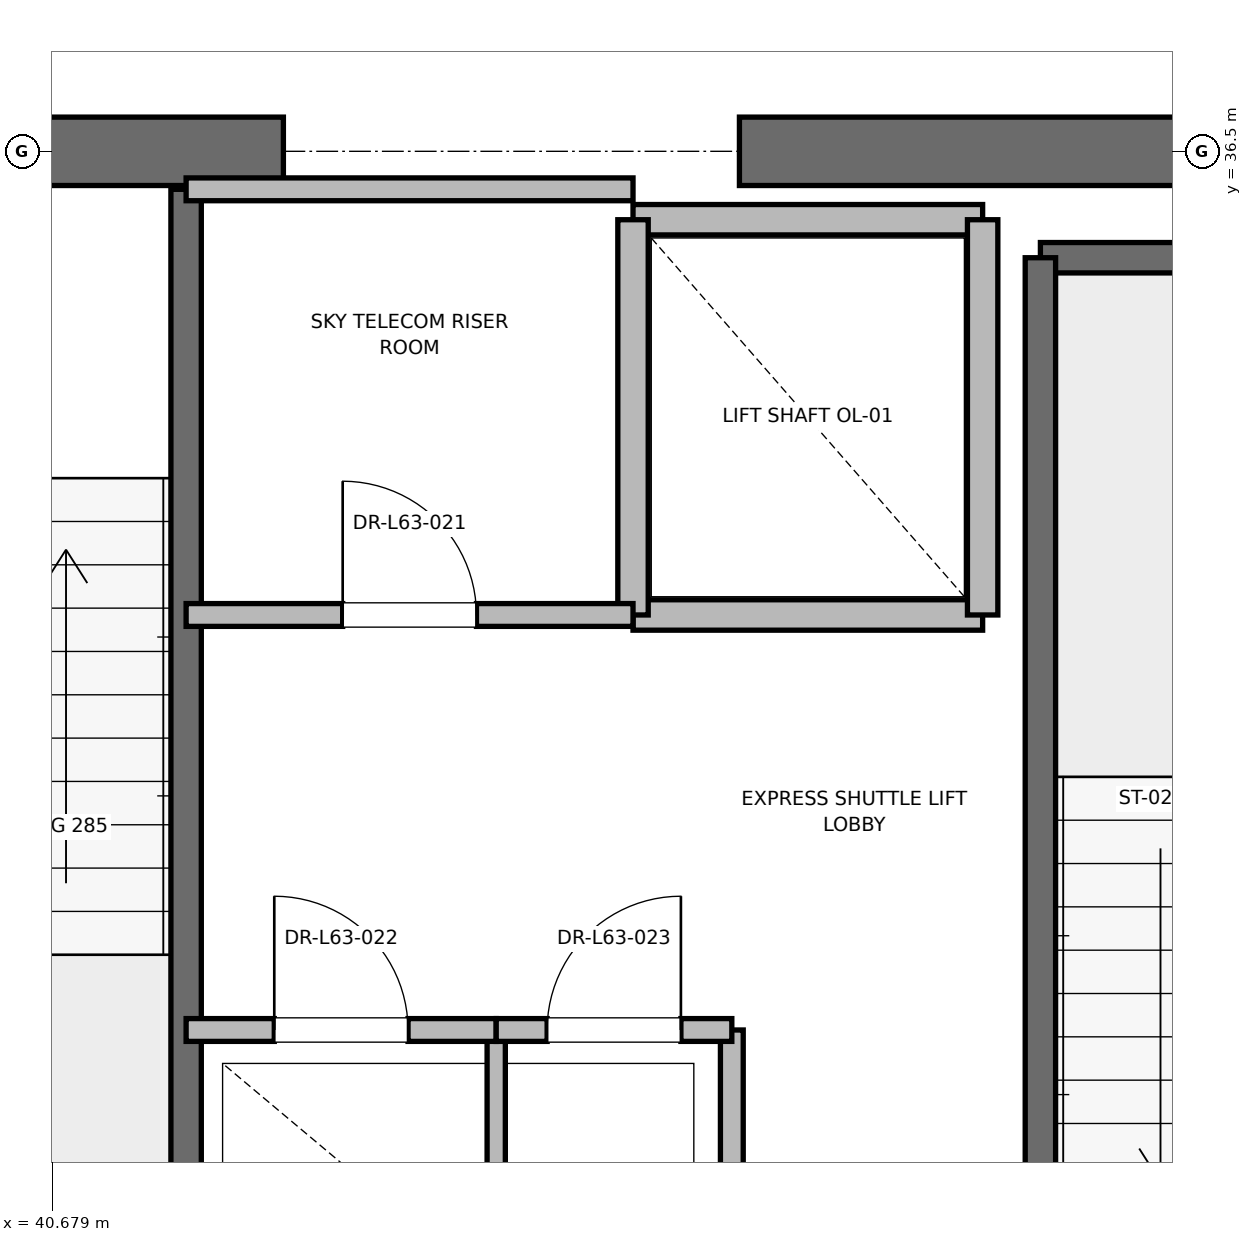
"""IFC4 building model, lengths in metres.
Left out: names, types, materials, properties, quantities, classifications, styles, units other than length and angle.
Written with IfcOpenShell. Run it as: python <this file> out.ifc"""

import sys

from ifc_helpers import new_model, si_unit, direction, frame, frame_2d, origin, place, context, subcontext, project, spatial, rectangle, extrude, element, fill, save


model = new_model("IFC4")
c1 = context("Model", 3, precision=1e-05, world=origin(), true_north=direction((0.0, 1.0)))
c2 = subcontext(c1, "Body", "Model", "MODEL_VIEW")
j1 = project(units=[si_unit("LENGTHUNIT", "METRE"), si_unit("PLANEANGLEUNIT", "RADIAN")], contexts=[c1])
p1 = place(None, origin())
s1 = spatial("IfcSite", under=j1, at=p1, CompositionType="ELEMENT")
p2 = place(p1, origin())
s2 = spatial("IfcBuilding", under=s1, at=p2, CompositionType="ELEMENT")
p3 = place(p2, frame((0.0, 0.0, 271.2)))
s3 = spatial("IfcBuildingStorey", under=s2, at=p3, CompositionType="ELEMENT", Elevation=271.2)
p4 = place(p3, frame((37.8, 36.5, 0.0), z_axis=(0.0, 0.0, 1.0), x_axis=(1.0, 0.0, 0.0)))
e1 = element("IfcWall", 1, at=p4, inside=s3, PredefinedType="SHEAR", context=c2, shape_type="SweptSolid", body=[
    extrude(rectangle(XDim=4.4, YDim=0.45, at=frame_2d((2.2, 0.0))), origin(), (0.0, 0.0, 1.0), 3.785),
])
p5 = place(p4, frame((1.65, 0.0, 0.0)))
e2 = element("IfcOpeningElement", 2, at=p5, cuts=e1, PredefinedType="OPENING", context=c2, shape_type="SweptSolid", body=[
    extrude(rectangle(XDim=1.1, YDim=2.15, at=frame_2d((0.55, 1.075))), frame((0.0, 0.225, 0.0), z_axis=(0.0, -1.0, 0.0), x_axis=(1.0, 0.0, 0.0)), (0.0, 0.0, 1.0), 0.45),
])
p6 = place(p3, frame((45.2, 36.5, 0.0), z_axis=(0.0, 0.0, 1.0), x_axis=(1.0, 0.0, 0.0)))
e3 = element("IfcWall", 3, at=p6, inside=s3, PredefinedType="SHEAR", context=c2, shape_type="SweptSolid", body=[
    extrude(rectangle(XDim=5.8, YDim=0.45, at=frame_2d((2.9, 0.0))), origin(), (0.0, 0.0, 1.0), 3.785),
])
p7 = place(p3, frame((47.18, 35.8, 0.0), z_axis=(0.0, 0.0, 1.0), x_axis=(1.0, 0.0, 0.0)))
e4 = element("IfcWall", 4, at=p7, inside=s3, PredefinedType="SOLIDWALL", context=c2, shape_type="SweptSolid", body=[
    extrude(rectangle(XDim=3.12, YDim=0.2, at=frame_2d((1.56, 0.0))), origin(), (0.0, 0.0, 1.0), 3.785),
])
p8 = place(p3, frame((47.18, 27.62, 0.0), z_axis=(0.0, 0.0, 1.0), x_axis=(0.0, 1.0, 0.0)))
e5 = element("IfcWall", 5, at=p8, inside=s3, PredefinedType="SOLIDWALL", context=c2, shape_type="SweptSolid", body=[
    extrude(rectangle(XDim=8.18, YDim=0.2, at=frame_2d((4.09, 0.0))), origin(), (0.0, 0.0, 1.0), 3.785),
])
p9 = place(p3, frame((41.56, 27.68, 0.0), z_axis=(0.0, 0.0, 1.0), x_axis=(0.0, 1.0, 0.0)))
e6 = element("IfcWall", 6, at=p9, inside=s3, PredefinedType="SOLIDWALL", context=c2, shape_type="SweptSolid", body=[
    extrude(rectangle(XDim=8.57, YDim=0.2, at=frame_2d((4.285, 0.0))), origin(), (0.0, 0.0, 1.0), 3.785),
])
p10 = place(p3, frame((44.5, 33.45, 0.0), z_axis=(0.0, 0.0, 1.0), x_axis=(1.0, 0.0, 0.0)))
e7 = element("IfcWall", 7, at=p10, inside=s3, PredefinedType="SOLIDWALL", context=c2, shape_type="SweptSolid", body=[
    extrude(rectangle(XDim=2.3, YDim=0.2, at=frame_2d((1.15, 0.0))), origin(), (0.0, 0.0, 1.0), 3.785),
])
p11 = place(p3, frame((46.8, 36.05, 0.0), z_axis=(0.0, 0.0, 1.0), x_axis=(-1.0, 0.0, 0.0)))
e8 = element("IfcWall", 8, at=p11, inside=s3, PredefinedType="SOLIDWALL", context=c2, shape_type="SweptSolid", body=[
    extrude(rectangle(XDim=2.3, YDim=0.2, at=frame_2d((1.15, 0.0))), origin(), (0.0, 0.0, 1.0), 2.865),
])
p12 = place(p3, frame((44.5, 36.05, 0.0), z_axis=(0.0, 0.0, 1.0), x_axis=(0.0, -1.0, 0.0)))
e9 = element("IfcWall", 9, at=p12, inside=s3, PredefinedType="SOLIDWALL", context=c2, shape_type="SweptSolid", body=[
    extrude(rectangle(XDim=2.6, YDim=0.2, at=frame_2d((1.3, 0.0))), origin(), (0.0, 0.0, 1.0), 2.865),
])
p13 = place(p3, frame((46.8, 33.45, 0.0), z_axis=(0.0, 0.0, 1.0), x_axis=(0.0, 1.0, 0.0)))
e10 = element("IfcWall", 10, at=p13, inside=s3, PredefinedType="SOLIDWALL", context=c2, shape_type="SweptSolid", body=[
    extrude(rectangle(XDim=2.6, YDim=0.2, at=frame_2d((1.3, 0.0))), origin(), (0.0, 0.0, 1.0), 3.785),
])
p14 = place(p3, frame((45.15, 27.62, 0.0), z_axis=(0.0, 0.0, 1.0), x_axis=(0.0, 1.0, 0.0)))
e11 = element("IfcWall", 11, at=p14, inside=s3, PredefinedType="PARTITIONING", context=c2, shape_type="SweptSolid", body=[
    extrude(rectangle(XDim=3.1, YDim=0.15, at=frame_2d((1.55, 0.0))), origin(), (0.0, 0.0, 1.0), 2.85),
])
p15 = place(p3, frame((43.6, 27.68, 0.0), z_axis=(0.0, 0.0, 1.0), x_axis=(0.0, 1.0, 0.0)))
e12 = element("IfcWall", 12, at=p15, inside=s3, PredefinedType="PARTITIONING", context=c2, shape_type="SweptSolid", body=[
    extrude(rectangle(XDim=3.04, YDim=0.12, at=frame_2d((1.52, 0.0))), origin(), (0.0, 0.0, 1.0), 2.85),
])
p16 = place(p3, frame((41.56, 30.72, 0.0), z_axis=(0.0, 0.0, 1.0), x_axis=(1.0, 0.0, 0.0)))
e13 = element("IfcWall", 13, at=p16, inside=s3, PredefinedType="PARTITIONING", context=c2, shape_type="SweptSolid", body=[
    extrude(rectangle(XDim=2.04, YDim=0.15, at=frame_2d((1.02, 0.0))), origin(), (0.0, 0.0, 1.0), 2.85),
])
p17 = place(p16, frame((0.58, 0.0, 0.0)))
e14 = element("IfcOpeningElement", 14, at=p17, cuts=e13, PredefinedType="OPENING", context=c2, shape_type="SweptSolid", body=[
    extrude(rectangle(XDim=0.88, YDim=2.1, at=frame_2d((0.44, 1.05))), frame((0.0, 0.075, 0.0), z_axis=(0.0, -1.0, 0.0), x_axis=(1.0, 0.0, 0.0)), (0.0, 0.0, 1.0), 0.15),
])
p18 = place(p3, frame((43.6, 30.72, 0.0), z_axis=(0.0, 0.0, 1.0), x_axis=(1.0, 0.0, 0.0)))
e15 = element("IfcWall", 15, at=p18, inside=s3, PredefinedType="PARTITIONING", context=c2, shape_type="SweptSolid", body=[
    extrude(rectangle(XDim=1.55, YDim=0.15, at=frame_2d((0.775, 0.0))), origin(), (0.0, 0.0, 1.0), 2.85),
])
p19 = place(p18, frame((0.335, 0.0, 0.0)))
e16 = element("IfcOpeningElement", 16, at=p19, cuts=e15, PredefinedType="OPENING", context=c2, shape_type="SweptSolid", body=[
    extrude(rectangle(XDim=0.88, YDim=2.1, at=frame_2d((0.44, 1.05))), frame((0.0, 0.075, 0.0), z_axis=(0.0, -1.0, 0.0), x_axis=(1.0, 0.0, 0.0)), (0.0, 0.0, 1.0), 0.15),
])
p20 = place(p3, frame((41.56, 36.25, 0.0), z_axis=(0.0, 0.0, 1.0), x_axis=(1.0, 0.0, 0.0)))
e17 = element("IfcWall", 17, at=p20, inside=s3, PredefinedType="PARTITIONING", context=c2, shape_type="SweptSolid", body=[
    extrude(rectangle(XDim=2.94, YDim=0.15, at=frame_2d((1.47, 0.0))), origin(), (0.0, 0.0, 1.0), 2.85),
])
p21 = place(p3, frame((41.56, 33.45, 0.0), z_axis=(0.0, 0.0, 1.0), x_axis=(1.0, 0.0, 0.0)))
e18 = element("IfcWall", 18, at=p21, inside=s3, PredefinedType="PARTITIONING", context=c2, shape_type="SweptSolid", body=[
    extrude(rectangle(XDim=2.94, YDim=0.15, at=frame_2d((1.47, 0.0))), origin(), (0.0, 0.0, 1.0), 2.85),
])
p22 = place(p21, frame((1.03, 0.0, 0.0)))
e19 = element("IfcOpeningElement", 19, at=p22, cuts=e18, PredefinedType="OPENING", context=c2, shape_type="SweptSolid", body=[
    extrude(rectangle(XDim=0.88, YDim=2.1, at=frame_2d((0.44, 1.05))), frame((0.0, 0.075, 0.0), z_axis=(0.0, -1.0, 0.0), x_axis=(1.0, 0.0, 0.0)), (0.0, 0.0, 1.0), 0.15),
])
p23 = place(p17, origin())
e20 = element("IfcDoor", 20, at=p23, inside=s3, OperationType="SINGLE_SWING_LEFT", PredefinedType="DOOR", context=c2, shape_type="SweptSolid", body=[
    extrude(rectangle(XDim=0.88, YDim=2.1, at=frame_2d((0.44, 1.05))), frame((0.0, 0.025, 0.0), z_axis=(0.0, -1.0, 0.0), x_axis=(1.0, 0.0, 0.0)), (0.0, 0.0, 1.0), 0.05),
])
fill(e14, e20)
p24 = place(p19, origin())
e21 = element("IfcDoor", 21, at=p24, inside=s3, OperationType="SINGLE_SWING_RIGHT", PredefinedType="DOOR", context=c2, shape_type="SweptSolid", body=[
    extrude(rectangle(XDim=0.88, YDim=2.1, at=frame_2d((0.44, 1.05))), frame((0.0, 0.025, 0.0), z_axis=(0.0, -1.0, 0.0), x_axis=(1.0, 0.0, 0.0)), (0.0, 0.0, 1.0), 0.05),
])
fill(e16, e21)
p25 = place(p22, origin())
e22 = element("IfcDoor", 22, at=p25, inside=s3, OperationType="SINGLE_SWING_LEFT", PredefinedType="DOOR", context=c2, shape_type="SweptSolid", body=[
    extrude(rectangle(XDim=0.88, YDim=2.1, at=frame_2d((0.44, 1.05))), frame((0.0, 0.025, 0.0), z_axis=(0.0, -1.0, 0.0), x_axis=(1.0, 0.0, 0.0)), (0.0, 0.0, 1.0), 0.05),
])
fill(e19, e22)
save(model, sys.argv[1])
